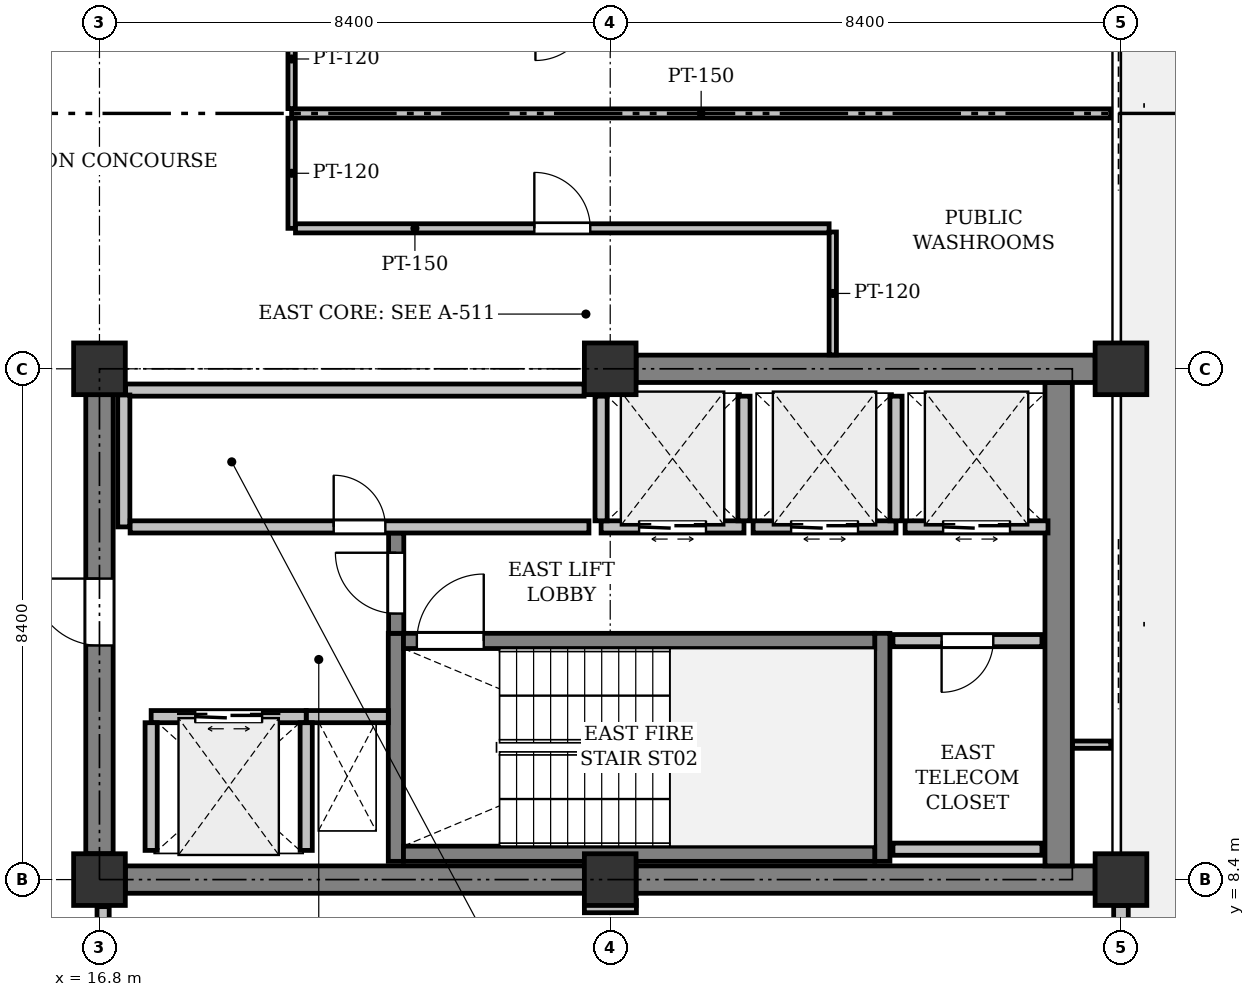
"""IFC4 building model, lengths in metres.
Left out: names, types, materials, properties, quantities, classifications, styles, units other than length and angle.
Written with IfcOpenShell. Run it as: python <this file> out.ifc"""

import sys

from ifc_helpers import new_model, si_unit, direction, frame, frame_2d, origin, origin_2d, place, context, subcontext, project, spatial, rectangle, extrude, element, fill, save


model = new_model("IFC4")
c1 = context("Model", 3, precision=1e-05, world=origin(), true_north=direction((0.0, 1.0)))
c2 = subcontext(c1, "Body", "Model", "MODEL_VIEW")
j1 = project(units=[si_unit("LENGTHUNIT", "METRE"), si_unit("PLANEANGLEUNIT", "RADIAN")], contexts=[c1])
p1 = place(None, origin())
s1 = spatial("IfcSite", under=j1, at=p1, CompositionType="ELEMENT")
p2 = place(p1, origin())
s2 = spatial("IfcBuilding", under=s1, at=p2, CompositionType="ELEMENT")
p3 = place(p2, frame((0.0, 0.0, 286.2)))
s3 = spatial("IfcBuildingStorey", under=s2, at=p3, CompositionType="ELEMENT", Elevation=286.2)
for number, where, z_axis, x_axis in (
    (1, (16.8, 8.4, 0.0), (0.0, 0.0, 1.0), (1.0, 0.0, 0.0)),
    (2, (16.8, 16.8, 0.0), (0.0, 0.0, 1.0), (1.0, 0.0, 0.0)),
    (3, (25.2, 8.4, 0.0), (0.0, 0.0, 1.0), (1.0, 0.0, 0.0)),
    (4, (25.2, 16.8, 0.0), (0.0, 0.0, 1.0), (1.0, 0.0, 0.0)),
    (5, (33.6, 8.4, 0.0), (0.0, 0.0, 1.0), (1.0, 0.0, 0.0)),
    (6, (33.6, 16.8, 0.0), (0.0, 0.0, 1.0), (1.0, 0.0, 0.0)),
):
    element("IfcColumn", number, at=place(p3, frame(where, z_axis=z_axis, x_axis=x_axis)), inside=s3, PredefinedType="COLUMN", context=c2, shape_type="SweptSolid", body=[
        extrude(rectangle(XDim=0.85, YDim=0.85, at=origin_2d()), origin(), (0.0, 0.0, 1.0), 4.0),
    ])
p4 = place(p3, frame((33.6, 7.975, 0.0), z_axis=(0.0, 0.0, 1.0), x_axis=(0.0, -1.0, 0.0)))
e7 = element("IfcWall", 7, at=p4, inside=s3, PredefinedType="STANDARD", context=c2, shape_type="SweptSolid", body=[
    extrude(rectangle(XDim=2.85, YDim=0.24, at=frame_2d((1.425, 0.0))), origin(), (0.0, 0.0, 1.0), 3.725),
])
p5 = place(p4, frame((0.3, 0.0, 0.0)))
e8 = element("IfcOpeningElement", 8, at=p5, cuts=e7, PredefinedType="OPENING", context=c2, shape_type="SweptSolid", body=[
    extrude(rectangle(XDim=1.2, YDim=2.2, at=frame_2d((0.6, 1.1))), frame((0.0, 0.13, 0.0), z_axis=(0.0, -1.0, 0.0), x_axis=(1.0, 0.0, 0.0)), (0.0, 0.0, 1.0), 0.26),
])
p6 = place(p3, frame((17.225, 8.4, 0.0), z_axis=(0.0, 0.0, 1.0), x_axis=(1.0, 0.0, 0.0)))
e9 = element("IfcWall", 9, at=p6, inside=s3, PredefinedType="SHEAR", context=c2, shape_type="SweptSolid", body=[
    extrude(rectangle(XDim=7.55, YDim=0.45, at=frame_2d((3.775, 0.0))), origin(), (0.0, 0.0, 1.0), 3.725),
])
p7 = place(p3, frame((25.625, 8.4, 0.0), z_axis=(0.0, 0.0, 1.0), x_axis=(1.0, 0.0, 0.0)))
e10 = element("IfcWall", 10, at=p7, inside=s3, PredefinedType="SHEAR", context=c2, shape_type="SweptSolid", body=[
    extrude(rectangle(XDim=7.55, YDim=0.45, at=frame_2d((3.775, 0.0))), origin(), (0.0, 0.0, 1.0), 3.725),
])
p8 = place(p3, frame((32.575, 8.625, 0.0), z_axis=(0.0, 0.0, 1.0), x_axis=(0.0, 1.0, 0.0)))
e11 = element("IfcWall", 11, at=p8, inside=s3, PredefinedType="SHEAR", context=c2, shape_type="SweptSolid", body=[
    extrude(rectangle(XDim=7.95, YDim=0.45, at=frame_2d((3.975, 0.0))), origin(), (0.0, 0.0, 1.0), 3.725),
])
p9 = place(p3, frame((16.8, 8.825, 0.0), z_axis=(0.0, 0.0, 1.0), x_axis=(0.0, 1.0, 0.0)))
e12 = element("IfcWall", 12, at=p9, inside=s3, PredefinedType="SHEAR", context=c2, shape_type="SweptSolid", body=[
    extrude(rectangle(XDim=7.55, YDim=0.45, at=frame_2d((3.775, 0.0))), origin(), (0.0, 0.0, 1.0), 3.725),
])
p10 = place(p9, frame((3.425, 0.0, 0.0)))
e13 = element("IfcOpeningElement", 13, at=p10, cuts=e12, PredefinedType="OPENING", context=c2, shape_type="SweptSolid", body=[
    extrude(rectangle(XDim=1.1, YDim=2.15, at=frame_2d((0.55, 1.075))), frame((0.0, 0.235, 0.0), z_axis=(0.0, -1.0, 0.0), x_axis=(1.0, 0.0, 0.0)), (0.0, 0.0, 1.0), 0.47),
])
p11 = place(p3, frame((25.625, 16.8, 0.0), z_axis=(0.0, 0.0, 1.0), x_axis=(1.0, 0.0, 0.0)))
e14 = element("IfcWall", 14, at=p11, inside=s3, PredefinedType="SHEAR", context=c2, shape_type="SweptSolid", body=[
    extrude(rectangle(XDim=7.55, YDim=0.45, at=frame_2d((3.775, 0.0))), origin(), (0.0, 0.0, 1.0), 3.725),
])
for number, where, z_axis, x_axis in (
    (15, (21.675, 8.7, 0.0), (0.0, 0.0, 1.0), (0.0, 1.0, 0.0)),
    (16, (29.675, 8.7, 0.0), (0.0, 0.0, 1.0), (0.0, 1.0, 0.0)),
):
    element("IfcWall", number, at=place(p3, frame(where, z_axis=z_axis, x_axis=x_axis)), inside=s3, PredefinedType="SHEAR", context=c2, shape_type="SweptSolid", body=[
        extrude(rectangle(XDim=3.75, YDim=0.25, at=frame_2d((1.875, 0.0))), origin(), (0.0, 0.0, 1.0), 3.725),
    ])
p12 = place(p3, frame((21.8, 8.825, 0.0), z_axis=(0.0, 0.0, 1.0), x_axis=(1.0, 0.0, 0.0)))
e17 = element("IfcWall", 17, at=p12, inside=s3, PredefinedType="SHEAR", context=c2, shape_type="SweptSolid", body=[
    extrude(rectangle(XDim=7.75, YDim=0.25, at=frame_2d((3.875, 0.0))), origin(), (0.0, 0.0, 1.0), 3.725),
])
p13 = place(p3, frame((21.8, 12.325, 0.0), z_axis=(0.0, 0.0, 1.0), x_axis=(1.0, 0.0, 0.0)))
e18 = element("IfcWall", 18, at=p13, inside=s3, PredefinedType="SHEAR", context=c2, shape_type="SweptSolid", body=[
    extrude(rectangle(XDim=7.75, YDim=0.25, at=frame_2d((3.875, 0.0))), origin(), (0.0, 0.0, 1.0), 3.725),
])
p14 = place(p13, frame((0.22, 0.0, 0.0)))
e19 = element("IfcOpeningElement", 19, at=p14, cuts=e18, PredefinedType="OPENING", context=c2, shape_type="SweptSolid", body=[
    extrude(rectangle(XDim=1.1, YDim=2.15, at=frame_2d((0.55, 1.075))), frame((0.0, 0.135, 0.0), z_axis=(0.0, -1.0, 0.0), x_axis=(1.0, 0.0, 0.0)), (0.0, 0.0, 1.0), 0.27),
])
p15 = place(p3, frame((20.2, 11.08, 0.0), z_axis=(0.0, 0.0, 1.0), x_axis=(1.0, 0.0, 0.0)))
e20 = element("IfcWall", 20, at=p15, inside=s3, PredefinedType="PARTITIONING", context=c2, shape_type="SweptSolid", body=[
    extrude(rectangle(XDim=1.35, YDim=0.2, at=frame_2d((0.675, 0.0))), origin(), (0.0, 0.0, 1.0), 3.725),
])
p16 = place(p3, frame((21.68, 12.45, 0.0), z_axis=(0.0, 0.0, 1.0), x_axis=(0.0, 1.0, 0.0)))
e21 = element("IfcWall", 21, at=p16, inside=s3, PredefinedType="SHEAR", context=c2, shape_type="SweptSolid", body=[
    extrude(rectangle(XDim=1.65, YDim=0.25, at=frame_2d((0.825, 0.0))), origin(), (0.0, 0.0, 1.0), 3.725),
])
p17 = place(p16, frame((0.325, 0.0, 0.0)))
e22 = element("IfcOpeningElement", 22, at=p17, cuts=e21, PredefinedType="OPENING", context=c2, shape_type="SweptSolid", body=[
    extrude(rectangle(XDim=1.0, YDim=2.15, at=frame_2d((0.5, 1.075))), frame((0.0, 0.135, 0.0), z_axis=(0.0, -1.0, 0.0), x_axis=(1.0, 0.0, 0.0)), (0.0, 0.0, 1.0), 0.27),
])
p18 = place(p3, frame((17.65, 11.08, 0.0), z_axis=(0.0, 0.0, 1.0), x_axis=(1.0, 0.0, 0.0)))
e23 = element("IfcWall", 23, at=p18, inside=s3, PredefinedType="PARTITIONING", context=c2, shape_type="SweptSolid", body=[
    extrude(rectangle(XDim=2.55, YDim=0.2, at=frame_2d((1.275, 0.0))), origin(), (0.0, 0.0, 1.0), 3.725),
])
p19 = place(p18, frame((0.725, 0.0, 0.0)))
e24 = element("IfcOpeningElement", 24, at=p19, cuts=e23, PredefinedType="OPENING", context=c2, shape_type="SweptSolid", body=[
    extrude(rectangle(XDim=1.1, YDim=2.2, at=frame_2d((0.55, 1.1))), frame((0.0, 0.11, 0.0), z_axis=(0.0, -1.0, 0.0), x_axis=(1.0, 0.0, 0.0)), (0.0, 0.0, 1.0), 0.22),
])
for number, where, z_axis, x_axis in (
    (25, (20.2, 8.88, 0.0), (0.0, 0.0, 1.0), (0.0, 1.0, 0.0)),
    (26, (17.65, 8.88, 0.0), (0.0, 0.0, 1.0), (0.0, 1.0, 0.0)),
):
    element("IfcWall", number, at=place(p3, frame(where, z_axis=z_axis, x_axis=x_axis)), inside=s3, PredefinedType="PARTITIONING", context=c2, shape_type="SweptSolid", body=[
        extrude(rectangle(XDim=2.1, YDim=0.2, at=frame_2d((1.05, 0.0))), origin(), (0.0, 0.0, 1.0), 3.725),
    ])
p20 = place(p3, frame((25.05, 14.2, 0.0), z_axis=(0.0, 0.0, 1.0), x_axis=(1.0, 0.0, 0.0)))
e27 = element("IfcWall", 27, at=p20, inside=s3, PredefinedType="PARTITIONING", context=c2, shape_type="SweptSolid", body=[
    extrude(rectangle(XDim=2.35, YDim=0.2, at=frame_2d((1.175, 0.0))), origin(), (0.0, 0.0, 1.0), 3.725),
])
p21 = place(p20, frame((0.625, 0.0, 0.0)))
e28 = element("IfcOpeningElement", 28, at=p21, cuts=e27, PredefinedType="OPENING", context=c2, shape_type="SweptSolid", body=[
    extrude(rectangle(XDim=1.1, YDim=2.2, at=frame_2d((0.55, 1.1))), frame((0.0, 0.11, 0.0), z_axis=(0.0, -1.0, 0.0), x_axis=(1.0, 0.0, 0.0)), (0.0, 0.0, 1.0), 0.22),
])
for number, where, z_axis, x_axis in (
    (29, (27.4, 14.3, 0.0), (0.0, 0.0, 1.0), (0.0, 1.0, 0.0)),
    (30, (25.05, 14.3, 0.0), (0.0, 0.0, 1.0), (0.0, 1.0, 0.0)),
):
    element("IfcWall", number, at=place(p3, frame(where, z_axis=z_axis, x_axis=x_axis)), inside=s3, PredefinedType="PARTITIONING", context=c2, shape_type="SweptSolid", body=[
        extrude(rectangle(XDim=2.05, YDim=0.2, at=frame_2d((1.025, 0.0))), origin(), (0.0, 0.0, 1.0), 3.725),
    ])
p22 = place(p3, frame((27.55, 14.2, 0.0), z_axis=(0.0, 0.0, 1.0), x_axis=(1.0, 0.0, 0.0)))
e31 = element("IfcWall", 31, at=p22, inside=s3, PredefinedType="PARTITIONING", context=c2, shape_type="SweptSolid", body=[
    extrude(rectangle(XDim=2.35, YDim=0.2, at=frame_2d((1.175, 0.0))), origin(), (0.0, 0.0, 1.0), 3.725),
])
p23 = place(p22, frame((0.625, 0.0, 0.0)))
e32 = element("IfcOpeningElement", 32, at=p23, cuts=e31, PredefinedType="OPENING", context=c2, shape_type="SweptSolid", body=[
    extrude(rectangle(XDim=1.1, YDim=2.2, at=frame_2d((0.55, 1.1))), frame((0.0, 0.11, 0.0), z_axis=(0.0, -1.0, 0.0), x_axis=(1.0, 0.0, 0.0)), (0.0, 0.0, 1.0), 0.22),
])
p24 = place(p3, frame((29.9, 14.3, 0.0), z_axis=(0.0, 0.0, 1.0), x_axis=(0.0, 1.0, 0.0)))
e33 = element("IfcWall", 33, at=p24, inside=s3, PredefinedType="PARTITIONING", context=c2, shape_type="SweptSolid", body=[
    extrude(rectangle(XDim=2.05, YDim=0.2, at=frame_2d((1.025, 0.0))), origin(), (0.0, 0.0, 1.0), 3.725),
])
p25 = place(p3, frame((30.05, 14.2, 0.0), z_axis=(0.0, 0.0, 1.0), x_axis=(1.0, 0.0, 0.0)))
e34 = element("IfcWall", 34, at=p25, inside=s3, PredefinedType="PARTITIONING", context=c2, shape_type="SweptSolid", body=[
    extrude(rectangle(XDim=2.35, YDim=0.2, at=frame_2d((1.175, 0.0))), origin(), (0.0, 0.0, 1.0), 3.725),
])
p26 = place(p25, frame((0.625, 0.0, 0.0)))
e35 = element("IfcOpeningElement", 35, at=p26, cuts=e34, PredefinedType="OPENING", context=c2, shape_type="SweptSolid", body=[
    extrude(rectangle(XDim=1.1, YDim=2.2, at=frame_2d((0.55, 1.1))), frame((0.0, 0.11, 0.0), z_axis=(0.0, -1.0, 0.0), x_axis=(1.0, 0.0, 0.0)), (0.0, 0.0, 1.0), 0.22),
])
p27 = place(p3, frame((24.77, 16.45, 0.0), z_axis=(0.0, 0.0, 1.0), x_axis=(-1.0, 0.0, 0.0)))
e36 = element("IfcWall", 36, at=p27, inside=s3, PredefinedType="PARTITIONING", context=c2, shape_type="SweptSolid", body=[
    extrude(rectangle(XDim=7.54, YDim=0.2, at=frame_2d((3.77, 0.0))), origin(), (0.0, 0.0, 1.0), 3.725),
])
p28 = place(p3, frame((17.2, 16.37, 0.0), z_axis=(0.0, 0.0, 1.0), x_axis=(0.0, -1.0, 0.0)))
e37 = element("IfcWall", 37, at=p28, inside=s3, PredefinedType="PARTITIONING", context=c2, shape_type="SweptSolid", body=[
    extrude(rectangle(XDim=2.17, YDim=0.2, at=frame_2d((1.085, 0.0))), origin(), (0.0, 0.0, 1.0), 3.725),
])
p29 = place(p3, frame((17.304, 14.2, 0.0), z_axis=(0.0, 0.0, 1.0), x_axis=(1.0, 0.0, 0.0)))
e38 = element("IfcWall", 38, at=p29, inside=s3, PredefinedType="PARTITIONING", context=c2, shape_type="SweptSolid", body=[
    extrude(rectangle(XDim=7.546, YDim=0.2, at=frame_2d((3.773, 0.0))), origin(), (0.0, 0.0, 1.0), 3.725),
])
p30 = place(p29, frame((3.348, 0.0, 0.0)))
e39 = element("IfcOpeningElement", 39, at=p30, cuts=e38, PredefinedType="OPENING", context=c2, shape_type="SweptSolid", body=[
    extrude(rectangle(XDim=0.85, YDim=2.15, at=frame_2d((0.425, 1.075))), frame((0.0, 0.11, 0.0), z_axis=(0.0, -1.0, 0.0), x_axis=(1.0, 0.0, 0.0)), (0.0, 0.0, 1.0), 0.22),
])
p31 = place(p3, frame((32.3, 12.33, 0.0), z_axis=(0.0, 0.0, 1.0), x_axis=(-1.0, 0.0, 0.0)))
e40 = element("IfcWall", 40, at=p31, inside=s3, PredefinedType="PARTITIONING", context=c2, shape_type="SweptSolid", body=[
    extrude(rectangle(XDim=2.45, YDim=0.2, at=frame_2d((1.225, 0.0))), origin(), (0.0, 0.0, 1.0), 3.725),
])
p32 = place(p31, frame((0.8, 0.0, 0.0)))
e41 = element("IfcOpeningElement", 41, at=p32, cuts=e40, PredefinedType="OPENING", context=c2, shape_type="SweptSolid", body=[
    extrude(rectangle(XDim=0.85, YDim=2.15, at=frame_2d((0.425, 1.075))), frame((0.0, 0.11, 0.0), z_axis=(0.0, -1.0, 0.0), x_axis=(1.0, 0.0, 0.0)), (0.0, 0.0, 1.0), 0.22),
])
p33 = place(p3, frame((29.85, 8.9, 0.0), z_axis=(0.0, 0.0, 1.0), x_axis=(1.0, 0.0, 0.0)))
e42 = element("IfcWall", 42, at=p33, inside=s3, PredefinedType="PARTITIONING", context=c2, shape_type="SweptSolid", body=[
    extrude(rectangle(XDim=2.45, YDim=0.2, at=frame_2d((1.225, 0.0))), origin(), (0.0, 0.0, 1.0), 3.725),
])
p34 = place(p3, frame((32.804, 10.619, 0.0), z_axis=(0.0, 0.0, 1.0), x_axis=(1.0, 0.0, 0.0)))
e43 = element("IfcWall", 43, at=p34, inside=s3, PredefinedType="PARTITIONING", context=c2, shape_type="SweptSolid", body=[
    extrude(rectangle(XDim=0.627, YDim=0.12, at=frame_2d((0.313, 0.0))), origin(), (0.0, 0.0, 1.0), 3.725),
])
p35 = place(p3, frame((33.431, 21.0, 0.0), z_axis=(0.0, 0.0, 1.0), x_axis=(-1.0, 0.0, 0.0)))
e44 = element("IfcWall", 44, at=p35, inside=s3, PredefinedType="PARTITIONING", context=c2, shape_type="SweptSolid", body=[
    extrude(rectangle(XDim=13.471, YDim=0.15, at=frame_2d((6.735, 0.0))), origin(), (0.0, 0.0, 1.0), 3.319),
])
p36 = place(p3, frame((19.96, 20.921, 0.0), z_axis=(0.0, 0.0, 1.0), x_axis=(0.0, -1.0, 0.0)))
e45 = element("IfcWall", 45, at=p36, inside=s3, PredefinedType="PARTITIONING", context=c2, shape_type="SweptSolid", body=[
    extrude(rectangle(XDim=1.811, YDim=0.12, at=frame_2d((0.905, 0.0))), origin(), (0.0, 0.0, 1.0), 3.725),
])
p37 = place(p3, frame((20.024, 19.11, 0.0), z_axis=(0.0, 0.0, 1.0), x_axis=(1.0, 0.0, 0.0)))
e46 = element("IfcWall", 46, at=p37, inside=s3, PredefinedType="PARTITIONING", context=c2, shape_type="SweptSolid", body=[
    extrude(rectangle(XDim=8.776, YDim=0.15, at=frame_2d((4.388, 0.0))), origin(), (0.0, 0.0, 1.0), 3.319),
])
p38 = place(p37, frame((3.928, 0.0, 0.0)))
e47 = element("IfcOpeningElement", 47, at=p38, cuts=e46, PredefinedType="OPENING", context=c2, shape_type="SweptSolid", body=[
    extrude(rectangle(XDim=0.92, YDim=2.1, at=frame_2d((0.46, 1.05))), frame((0.0, 0.085, 0.0), z_axis=(0.0, -1.0, 0.0), x_axis=(1.0, 0.0, 0.0)), (0.0, 0.0, 1.0), 0.17),
])
p39 = place(p3, frame((28.86, 19.05, 0.0), z_axis=(0.0, 0.0, 1.0), x_axis=(0.0, -1.0, 0.0)))
e48 = element("IfcWall", 48, at=p39, inside=s3, PredefinedType="PARTITIONING", context=c2, shape_type="SweptSolid", body=[
    extrude(rectangle(XDim=2.021, YDim=0.12, at=frame_2d((1.01, 0.0))), origin(), (0.0, 0.0, 1.0), 3.725),
])
p40 = place(p3, frame((19.96, 22.711, 0.0), z_axis=(0.0, 0.0, 1.0), x_axis=(0.0, -1.0, 0.0)))
e49 = element("IfcWall", 49, at=p40, inside=s3, PredefinedType="PARTITIONING", context=c2, shape_type="SweptSolid", body=[
    extrude(rectangle(XDim=1.632, YDim=0.12, at=frame_2d((0.816, 0.0))), origin(), (0.0, 0.0, 1.0), 3.725),
])
p41 = place(p3, frame((25.631, 7.956, 0.0), z_axis=(0.0, 0.0, 1.0), x_axis=(-0.99999963391, -0.000855675671, 0.0)))
e50 = element("IfcWall", 50, at=p41, inside=s3, PredefinedType="PARTITIONING", context=c2, shape_type="SweptSolid", body=[
    extrude(rectangle(XDim=0.856, YDim=0.2, at=frame_2d((0.428, 0.0))), origin(), (0.0, 0.0, 1.0), 3.319),
])
p42 = place(p3, frame((16.86, 7.955, 0.0), z_axis=(0.0, 0.0, 1.0), x_axis=(0.0, -1.0, 0.0)))
e51 = element("IfcWall", 51, at=p42, inside=s3, PredefinedType="PARTITIONING", context=c2, shape_type="SweptSolid", body=[
    extrude(rectangle(XDim=2.555, YDim=0.2, at=frame_2d((1.278, 0.0))), origin(), (0.0, 0.0, 1.0), 3.319),
])
p43 = place(p42, frame((0.778, 0.0, 0.0)))
e52 = element("IfcOpeningElement", 52, at=p43, cuts=e51, PredefinedType="OPENING", context=c2, shape_type="SweptSolid", body=[
    extrude(rectangle(XDim=1.0, YDim=2.15, at=frame_2d((0.5, 1.075))), frame((0.0, 0.11, 0.0), z_axis=(0.0, -1.0, 0.0), x_axis=(1.0, 0.0, 0.0)), (0.0, 0.0, 1.0), 0.22),
])
p44 = place(p10, origin())
e53 = element("IfcDoor", 53, at=p44, inside=s3, OperationType="SINGLE_SWING_RIGHT", PredefinedType="DOOR", context=c2, shape_type="SweptSolid", body=[
    extrude(rectangle(XDim=1.1, YDim=2.15, at=frame_2d((0.55, 1.075))), frame((0.0, 0.025, 0.0), z_axis=(0.0, -1.0, 0.0), x_axis=(1.0, 0.0, 0.0)), (0.0, 0.0, 1.0), 0.05),
])
fill(e13, e53)
p45 = place(p14, origin())
e54 = element("IfcDoor", 54, at=p45, inside=s3, OperationType="SINGLE_SWING_RIGHT", PredefinedType="DOOR", context=c2, shape_type="SweptSolid", body=[
    extrude(rectangle(XDim=1.1, YDim=2.15, at=frame_2d((0.55, 1.075))), frame((0.0, 0.025, 0.0), z_axis=(0.0, -1.0, 0.0), x_axis=(1.0, 0.0, 0.0)), (0.0, 0.0, 1.0), 0.05),
])
fill(e19, e54)
p46 = place(p17, origin())
e55 = element("IfcDoor", 55, at=p46, inside=s3, OperationType="SINGLE_SWING_RIGHT", PredefinedType="DOOR", context=c2, shape_type="SweptSolid", body=[
    extrude(rectangle(XDim=1.0, YDim=2.15, at=frame_2d((0.5, 1.075))), frame((0.0, 0.025, 0.0), z_axis=(0.0, -1.0, 0.0), x_axis=(1.0, 0.0, 0.0)), (0.0, 0.0, 1.0), 0.05),
])
fill(e22, e55)
p47 = place(p19, origin())
e56 = element("IfcDoor", 56, at=p47, inside=s3, OperationType="DOUBLE_DOOR_SLIDING", PredefinedType="DOOR", context=c2, shape_type="SweptSolid", body=[
    extrude(rectangle(XDim=1.1, YDim=2.2, at=frame_2d((0.55, 1.1))), frame((0.0, 0.025, 0.0), z_axis=(0.0, -1.0, 0.0), x_axis=(1.0, 0.0, 0.0)), (0.0, 0.0, 1.0), 0.05),
])
fill(e24, e56)
p48 = place(p21, origin())
e57 = element("IfcDoor", 57, at=p48, inside=s3, OperationType="DOUBLE_DOOR_SLIDING", PredefinedType="DOOR", context=c2, shape_type="SweptSolid", body=[
    extrude(rectangle(XDim=1.1, YDim=2.2, at=frame_2d((0.55, 1.1))), frame((0.0, 0.025, 0.0), z_axis=(0.0, -1.0, 0.0), x_axis=(1.0, 0.0, 0.0)), (0.0, 0.0, 1.0), 0.05),
])
fill(e28, e57)
p49 = place(p23, origin())
e58 = element("IfcDoor", 58, at=p49, inside=s3, OperationType="DOUBLE_DOOR_SLIDING", PredefinedType="DOOR", context=c2, shape_type="SweptSolid", body=[
    extrude(rectangle(XDim=1.1, YDim=2.2, at=frame_2d((0.55, 1.1))), frame((0.0, 0.025, 0.0), z_axis=(0.0, -1.0, 0.0), x_axis=(1.0, 0.0, 0.0)), (0.0, 0.0, 1.0), 0.05),
])
fill(e32, e58)
p50 = place(p26, origin())
e59 = element("IfcDoor", 59, at=p50, inside=s3, OperationType="DOUBLE_DOOR_SLIDING", PredefinedType="DOOR", context=c2, shape_type="SweptSolid", body=[
    extrude(rectangle(XDim=1.1, YDim=2.2, at=frame_2d((0.55, 1.1))), frame((0.0, 0.025, 0.0), z_axis=(0.0, -1.0, 0.0), x_axis=(1.0, 0.0, 0.0)), (0.0, 0.0, 1.0), 0.05),
])
fill(e35, e59)
p51 = place(p30, origin())
e60 = element("IfcDoor", 60, at=p51, inside=s3, OperationType="SINGLE_SWING_LEFT", PredefinedType="DOOR", context=c2, shape_type="SweptSolid", body=[
    extrude(rectangle(XDim=0.85, YDim=2.15, at=frame_2d((0.425, 1.075))), frame((0.0, 0.025, 0.0), z_axis=(0.0, -1.0, 0.0), x_axis=(1.0, 0.0, 0.0)), (0.0, 0.0, 1.0), 0.05),
])
fill(e39, e60)
p52 = place(p32, origin())
e61 = element("IfcDoor", 61, at=p52, inside=s3, OperationType="SINGLE_SWING_RIGHT", PredefinedType="DOOR", context=c2, shape_type="SweptSolid", body=[
    extrude(rectangle(XDim=0.85, YDim=2.15, at=frame_2d((0.425, 1.075))), frame((0.0, 0.025, 0.0), z_axis=(0.0, -1.0, 0.0), x_axis=(1.0, 0.0, 0.0)), (0.0, 0.0, 1.0), 0.05),
])
fill(e41, e61)
p53 = place(p38, origin())
e62 = element("IfcDoor", 62, at=p53, inside=s3, OperationType="SINGLE_SWING_LEFT", PredefinedType="DOOR", context=c2, shape_type="SweptSolid", body=[
    extrude(rectangle(XDim=0.92, YDim=2.1, at=frame_2d((0.46, 1.05))), frame((0.0, 0.025, 0.0), z_axis=(0.0, -1.0, 0.0), x_axis=(1.0, 0.0, 0.0)), (0.0, 0.0, 1.0), 0.05),
])
fill(e47, e62)
save(model, sys.argv[1])
